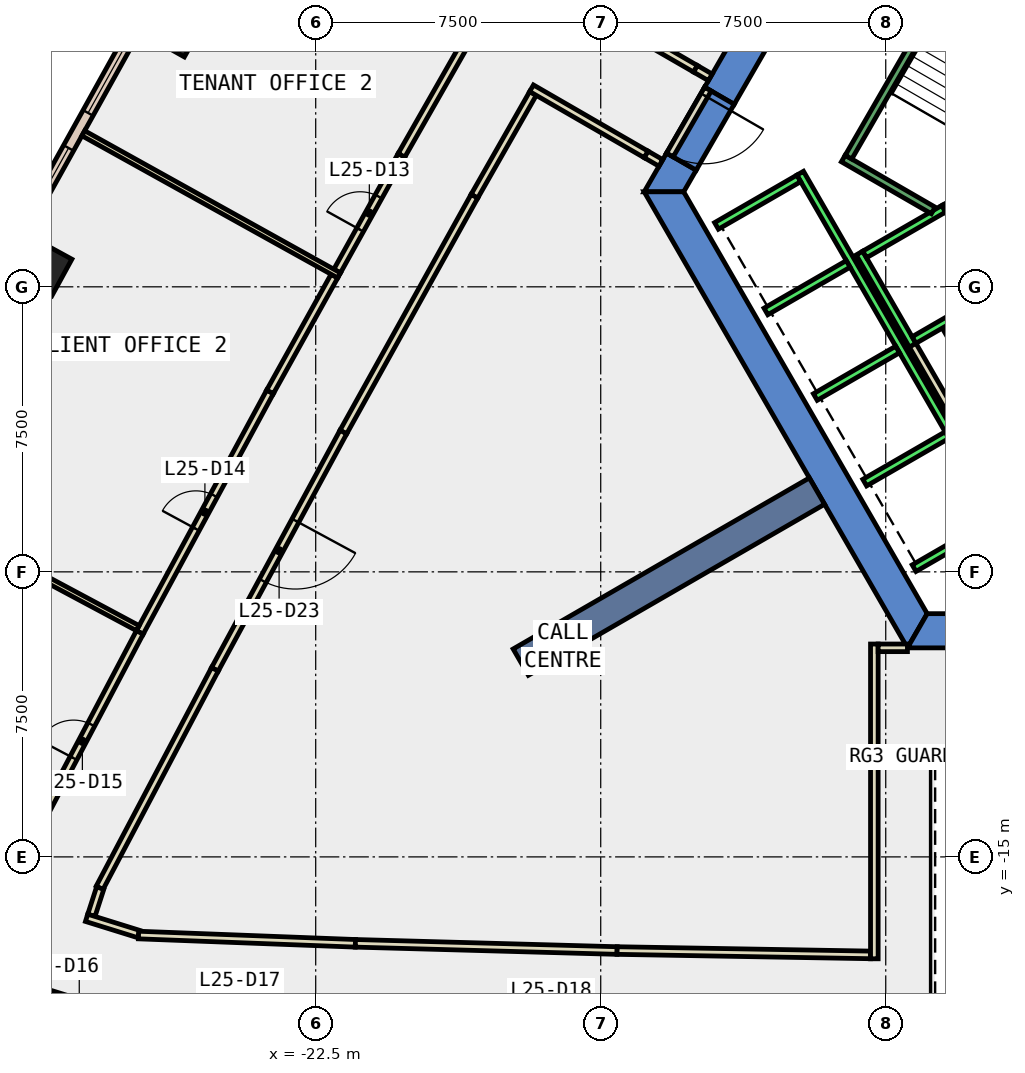
"""IFC4 building model, lengths in metres.
Left out: names, types, materials, properties, quantities, classifications, styles, units other than length and angle.
Written with IfcOpenShell. Run it as: python <this file> out.ifc"""

import sys

from ifc_helpers import new_model, si_unit, direction, frame, frame_2d, origin, origin_2d, place, context, subcontext, project, spatial, polyline, rectangle, outline, extrude, element, fill, save


model = new_model("IFC4")
c1 = context("Model", 3, precision=1e-05, world=origin(), true_north=direction((0.0, 1.0)))
c2 = subcontext(c1, "Body", "Model", "MODEL_VIEW")
j1 = project(units=[si_unit("LENGTHUNIT", "METRE"), si_unit("PLANEANGLEUNIT", "RADIAN")], contexts=[c1])
p1 = place(None, origin())
s1 = spatial("IfcSite", under=j1, at=p1, CompositionType="ELEMENT")
p2 = place(p1, origin())
s2 = spatial("IfcBuilding", under=s1, at=p2, CompositionType="ELEMENT")
p3 = place(p2, frame((0.0, 0.0, 116.0)))
s3 = spatial("IfcBuildingStorey", under=s2, at=p3, CompositionType="ELEMENT", Elevation=116.0)
for number, where, z_axis, x_axis in (
    (1, (-26.341, 6.896, -0.4), (0.0, 0.0, 1.0), (0.49, 0.872, 0.0)),
    (2, (-29.838, 0.604, -0.4), (0.0, 0.0, 1.0), (0.48, 0.877, 0.0)),
):
    element("IfcColumn", number, at=place(p3, frame(where, z_axis=z_axis, x_axis=x_axis)), inside=s3, PredefinedType="COLUMN", context=c2, shape_type="SweptSolid", body=[
        extrude(rectangle(XDim=1.1, YDim=1.5, at=origin_2d()), origin(), (0.0, 0.0, 1.0), 4.2),
    ])
p4 = place(p3, frame((0.0, 0.0, -0.4)))
e3 = element("IfcWall", 3, at=p4, inside=s3, PredefinedType="SHEAR", context=c2, shape_type="SweptSolid", body=[
    extrude(outline(polyline([(-12.267, 5.252), (-11.488, 4.802), (-6.409, 13.6), (-6.928, 14.5), (-12.267, 5.252)])), origin(), (0.0, 0.0, 1.0), 4.2),
])
p5 = place(p3, frame((0.0, 0.0, -0.4)))
e4 = element("IfcWall", 4, at=p5, inside=s3, PredefinedType="SHEAR", context=c2, shape_type="SweptSolid", body=[
    extrude(outline(polyline([(-12.488, 3.07), (-13.267, 3.52), (-13.856, 2.5), (-12.817, 2.5), (-12.488, 3.07)])), origin(), (0.0, 0.0, 1.0), 4.2),
])
p6 = place(p3, frame((0.0, 0.0, 3.6)))
e5 = element("IfcWall", 5, at=p6, inside=s3, PredefinedType="SHEAR", context=c2, shape_type="SweptSolid", body=[
    extrude(outline(polyline([(-13.267, 3.52), (-12.488, 3.07), (-11.488, 4.802), (-12.267, 5.252), (-13.267, 3.52)])), origin(), (0.0, 0.0, 1.0), 0.2),
])
p7 = place(p3, frame((0.0, 0.0, -0.4)))
e6 = element("IfcWall", 6, at=p7, inside=s3, PredefinedType="SHEAR", context=c2, shape_type="SweptSolid", body=[
    extrude(outline(polyline([(-13.856, 2.5), (-6.928, -9.5), (-6.409, -8.6), (-12.817, 2.5), (-13.856, 2.5)])), origin(), (0.0, 0.0, 1.0), 4.2),
])
p8 = place(p3, frame((0.0, 0.0, -0.4)))
e7 = element("IfcWall", 7, at=p8, inside=s3, PredefinedType="SHEAR", context=c2, shape_type="SweptSolid", body=[
    extrude(outline(polyline([(3.75, -9.5), (3.75, -8.6), (-6.409, -8.6), (-6.928, -9.5), (3.75, -9.5)])), origin(), (0.0, 0.0, 1.0), 4.2),
])
p9 = place(p3, frame((-9.31, -5.375, -0.4), z_axis=(0.0, 0.0, 1.0), x_axis=(-0.866017533419, -0.500013631625, 0.0)))
e8 = element("IfcWall", 8, at=p9, inside=s3, PredefinedType="SHEAR", context=c2, shape_type="SweptSolid", body=[
    extrude(rectangle(XDim=9.0, YDim=0.8, at=frame_2d((4.5, 0.0))), origin(), (0.0, 0.0, 1.0), 4.2),
])
p10 = place(p3, frame((-27.262, 6.784, 0.0), z_axis=(0.0, 0.0, 1.0), x_axis=(-0.485822751649, -0.874057351654, 0.0)))
e9 = element("IfcWall", 9, at=p10, inside=s3, PredefinedType="STANDARD", context=c2, shape_type="SweptSolid", body=[
    extrude(rectangle(XDim=6.109, YDim=0.3, at=frame_2d((3.055, 0.0))), origin(), (0.0, 0.0, 1.0), 3.8),
])
p11 = place(p10, frame((0.527, 0.0, 0.9)))
e10 = element("IfcOpeningElement", 10, at=p11, cuts=e9, PredefinedType="OPENING", context=c2, shape_type="SweptSolid", body=[
    extrude(rectangle(XDim=2.0, YDim=2.6, at=frame_2d((1.0, 1.3))), frame((0.0, 0.16, 0.0), z_axis=(0.0, -1.0, 0.0), x_axis=(1.0, 0.0, 0.0)), (0.0, 0.0, 1.0), 0.32),
])
p12 = place(p10, frame((3.582, 0.0, 0.9)))
e11 = element("IfcOpeningElement", 11, at=p12, cuts=e9, PredefinedType="OPENING", context=c2, shape_type="SweptSolid", body=[
    extrude(rectangle(XDim=2.0, YDim=2.6, at=frame_2d((1.0, 1.3))), frame((0.0, 0.16, 0.0), z_axis=(0.0, -1.0, 0.0), x_axis=(1.0, 0.0, 0.0)), (0.0, 0.0, 1.0), 0.32),
])
p13 = place(p3, frame((-15.532, 7.484, 0.0), z_axis=(0.0, 0.0, 1.0), x_axis=(0.866045954906, -0.499964402723, 0.0)))
e12 = element("IfcWall", 12, at=p13, inside=s3, PredefinedType="PARTITIONING", context=c2, shape_type="SweptSolid", body=[
    extrude(rectangle(XDim=3.494, YDim=0.2, at=frame_2d((1.747, 0.0))), origin(), (0.0, 0.0, 1.0), 3.8),
])
p14 = place(p3, frame((-13.417, 3.26, 0.0), z_axis=(0.0, 0.0, 1.0), x_axis=(-0.866032067792, 0.499988457423, 0.0)))
e13 = element("IfcWall", 13, at=p14, inside=s3, PredefinedType="PARTITIONING", context=c2, shape_type="SweptSolid", body=[
    extrude(rectangle(XDim=0.45, YDim=0.2, at=frame_2d((0.225, 0.0))), origin(), (0.0, 0.0, 1.0), 2.4),
])
p15 = place(p3, frame((-16.783, 5.088, 0.0), z_axis=(0.0, 0.0, 1.0), x_axis=(-0.495023676383, -0.868879485211, 0.0)))
e14 = element("IfcWall", 14, at=p15, inside=s3, PredefinedType="PARTITIONING", context=c2, shape_type="SweptSolid", body=[
    extrude(rectangle(XDim=3.113, YDim=0.2, at=frame_2d((1.557, 0.0))), origin(), (0.0, 0.0, 1.0), 3.8),
])
p16 = place(p3, frame((-18.324, 2.383, 0.0), z_axis=(0.0, 0.0, 1.0), x_axis=(-0.485826874234, -0.874055060206, 0.0)))
e15 = element("IfcWall", 15, at=p16, inside=s3, PredefinedType="PARTITIONING", context=c2, shape_type="SweptSolid", body=[
    extrude(rectangle(XDim=7.099, YDim=0.2, at=frame_2d((3.55, 0.0))), origin(), (0.0, 0.0, 1.0), 3.8),
])
p17 = place(p3, frame((-21.773, -3.822, 0.0), z_axis=(0.0, 0.0, 1.0), x_axis=(-0.476124717613, -0.87937776483, 0.0)))
e16 = element("IfcWall", 16, at=p17, inside=s3, PredefinedType="PARTITIONING", context=c2, shape_type="SweptSolid", body=[
    extrude(rectangle(XDim=7.099, YDim=0.2, at=frame_2d((3.55, 0.0))), origin(), (0.0, 0.0, 1.0), 3.8),
])
p18 = place(p17, frame((2.65, 0.0, 0.0)))
e17 = element("IfcOpeningElement", 17, at=p18, cuts=e16, PredefinedType="OPENING", context=c2, shape_type="SweptSolid", body=[
    extrude(rectangle(XDim=1.8, YDim=2.1, at=frame_2d((0.9, 1.05))), frame((0.0, 0.11, 0.0), z_axis=(0.0, -1.0, 0.0), x_axis=(1.0, 0.0, 0.0)), (0.0, 0.0, 1.0), 0.22),
])
p19 = place(p3, frame((-25.153, -10.065, 0.0), z_axis=(0.0, 0.0, 1.0), x_axis=(-0.466663976618, -0.884434696813, 0.0)))
e18 = element("IfcWall", 18, at=p19, inside=s3, PredefinedType="PARTITIONING", context=c2, shape_type="SweptSolid", body=[
    extrude(rectangle(XDim=6.501, YDim=0.2, at=frame_2d((3.25, 0.0))), origin(), (0.0, 0.0, 1.0), 3.8),
])
p20 = place(p3, frame((-28.171, -15.821, 0.0), z_axis=(0.0, 0.0, 1.0), x_axis=(-0.308053137273, -0.951369152651, 0.0)))
e19 = element("IfcWall", 19, at=p20, inside=s3, PredefinedType="PARTITIONING", context=c2, shape_type="SweptSolid", body=[
    extrude(rectangle(XDim=0.754, YDim=0.2, at=frame_2d((0.377, 0.0))), origin(), (0.0, 0.0, 1.0), 3.8),
])
p21 = place(p3, frame((-28.529, -16.603, 0.0), z_axis=(0.0, 0.0, 1.0), x_axis=(0.954829998701, -0.297152609916, 0.0)))
e20 = element("IfcWall", 20, at=p21, inside=s3, PredefinedType="PARTITIONING", context=c2, shape_type="SweptSolid", body=[
    extrude(rectangle(XDim=1.437, YDim=0.2, at=frame_2d((0.719, 0.0))), origin(), (0.0, 0.0, 1.0), 3.8),
])
p22 = place(p3, frame((-27.162, -17.056, 0.0), z_axis=(0.0, 0.0, 1.0), x_axis=(0.999270868304, -0.038180253525, 0.0)))
e21 = element("IfcWall", 21, at=p22, inside=s3, PredefinedType="PARTITIONING", context=c2, shape_type="SweptSolid", body=[
    extrude(rectangle(XDim=5.71, YDim=0.2, at=frame_2d((2.855, 0.0))), origin(), (0.0, 0.0, 1.0), 3.8),
])
p23 = place(p3, frame((-21.456, -17.274, 0.0), z_axis=(0.0, 0.0, 1.0), x_axis=(0.999618915549, -0.02760477632, 0.0)))
e22 = element("IfcWall", 22, at=p23, inside=s3, PredefinedType="PARTITIONING", context=c2, shape_type="SweptSolid", body=[
    extrude(rectangle(XDim=6.89, YDim=0.2, at=frame_2d((3.445, 0.0))), origin(), (0.0, 0.0, 1.0), 3.8),
])
p24 = place(p3, frame((-14.569, -17.464, 0.0), z_axis=(0.0, 0.0, 1.0), x_axis=(0.999851389672, -0.017239448129, 0.0)))
e23 = element("IfcWall", 23, at=p24, inside=s3, PredefinedType="PARTITIONING", context=c2, shape_type="SweptSolid", body=[
    extrude(rectangle(XDim=6.67, YDim=0.2, at=frame_2d((3.335, 0.0))), origin(), (0.0, 0.0, 1.0), 3.8),
])
p25 = place(p3, frame((-21.936, 0.414, 0.0), z_axis=(0.0, 0.0, 1.0), x_axis=(0.485827202541, 0.874054877723, 0.0)))
e24 = element("IfcWall", 24, at=p25, inside=s3, PredefinedType="PARTITIONING", context=c2, shape_type="SweptSolid", body=[
    extrude(rectangle(XDim=3.487, YDim=0.2, at=frame_2d((1.744, 0.0))), origin(), (0.0, 0.0, 1.0), 3.8),
])
p26 = place(p25, frame((1.244, 0.0, 0.0)))
e25 = element("IfcOpeningElement", 25, at=p26, cuts=e24, PredefinedType="OPENING", context=c2, shape_type="SweptSolid", body=[
    extrude(rectangle(XDim=1.0, YDim=2.1, at=frame_2d((0.5, 1.05))), frame((0.0, 0.11, 0.0), z_axis=(0.0, -1.0, 0.0), x_axis=(1.0, 0.0, 0.0)), (0.0, 0.0, 1.0), 0.22),
])
p27 = place(p3, frame((-20.242, 3.462, 0.0), z_axis=(0.0, 0.0, 1.0), x_axis=(0.495309264725, 0.868716715781, 0.0)))
e26 = element("IfcWall", 26, at=p27, inside=s3, PredefinedType="PARTITIONING", context=c2, shape_type="SweptSolid", body=[
    extrude(rectangle(XDim=3.487, YDim=0.2, at=frame_2d((1.743, 0.0))), origin(), (0.0, 0.0, 1.0), 3.8),
])
p28 = place(p3, frame((-27.129, -9.094, 0.0), z_axis=(0.0, 0.0, 1.0), x_axis=(0.476090835435, 0.879396108938, 0.0)))
e27 = element("IfcWall", 27, at=p28, inside=s3, PredefinedType="PARTITIONING", context=c2, shape_type="SweptSolid", body=[
    extrude(rectangle(XDim=7.198, YDim=0.2, at=frame_2d((3.599, 0.0))), origin(), (0.0, 0.0, 1.0), 3.8),
])
p29 = place(p28, frame((3.099, 0.0, 0.0)))
e28 = element("IfcOpeningElement", 28, at=p29, cuts=e27, PredefinedType="OPENING", context=c2, shape_type="SweptSolid", body=[
    extrude(rectangle(XDim=1.0, YDim=2.1, at=frame_2d((0.5, 1.05))), frame((0.0, 0.11, 0.0), z_axis=(0.0, -1.0, 0.0), x_axis=(1.0, 0.0, 0.0)), (0.0, 0.0, 1.0), 0.22),
])
p30 = place(p3, frame((-23.702, -2.764, 0.0), z_axis=(0.0, 0.0, 1.0), x_axis=(0.485892653581, 0.874018494767, 0.0)))
e29 = element("IfcWall", 29, at=p30, inside=s3, PredefinedType="PARTITIONING", context=c2, shape_type="SweptSolid", body=[
    extrude(rectangle(XDim=3.486, YDim=0.2, at=frame_2d((1.743, 0.0))), origin(), (0.0, 0.0, 1.0), 3.8),
])
p31 = place(p3, frame((-30.221, -14.956, 0.0), z_axis=(0.0, 0.0, 1.0), x_axis=(0.466543318111, 0.884498350663, 0.0)))
e30 = element("IfcWall", 30, at=p31, inside=s3, PredefinedType="PARTITIONING", context=c2, shape_type="SweptSolid", body=[
    extrude(rectangle(XDim=6.627, YDim=0.2, at=frame_2d((3.314, 0.0))), origin(), (0.0, 0.0, 1.0), 3.8),
])
p32 = place(p31, frame((2.889, 0.0, 0.0)))
e31 = element("IfcOpeningElement", 31, at=p32, cuts=e30, PredefinedType="OPENING", context=c2, shape_type="SweptSolid", body=[
    extrude(rectangle(XDim=1.0, YDim=2.1, at=frame_2d((0.5, 1.05))), frame((0.0, 0.11, 0.0), z_axis=(0.0, -1.0, 0.0), x_axis=(1.0, 0.0, 0.0)), (0.0, 0.0, 1.0), 0.22),
])
p33 = place(p3, frame((-27.533, -19.217, 0.0), z_axis=(0.0, 0.0, 1.0), x_axis=(-0.954946345159, 0.296778499671, 0.0)))
e32 = element("IfcWall", 32, at=p33, inside=s3, PredefinedType="PARTITIONING", context=c2, shape_type="SweptSolid", body=[
    extrude(rectangle(XDim=2.49, YDim=0.2, at=frame_2d((1.245, 0.0))), origin(), (0.0, 0.0, 1.0), 3.8),
])
p34 = place(p33, frame((0.745, 0.0, 0.0)))
e33 = element("IfcOpeningElement", 33, at=p34, cuts=e32, PredefinedType="OPENING", context=c2, shape_type="SweptSolid", body=[
    extrude(rectangle(XDim=1.0, YDim=2.1, at=frame_2d((0.5, 1.05))), frame((0.0, 0.11, 0.0), z_axis=(0.0, -1.0, 0.0), x_axis=(1.0, 0.0, 0.0)), (0.0, 0.0, 1.0), 0.22),
])
p35 = place(p3, frame((-5.126, -2.422, 0.0), z_axis=(0.0, 0.0, 1.0), x_axis=(-0.500062241894, 0.865989465428, 0.0)))
e34 = element("IfcWall", 34, at=p35, inside=s3, PredefinedType="PARTITIONING", context=c2, shape_type="SweptSolid", body=[
    extrude(rectangle(XDim=1.7, YDim=0.2, at=frame_2d((0.85, 0.0))), origin(), (0.0, 0.0, 1.0), 3.8),
])
p36 = place(p3, frame((-5.492, -3.788, 0.0), z_axis=(0.0, 0.0, 1.0), x_axis=(-0.500008949224, 0.866020236886, 0.0)))
e35 = element("IfcWall", 35, at=p36, inside=s3, PredefinedType="PARTITIONING", context=c2, shape_type="SweptSolid", body=[
    extrude(rectangle(XDim=2.68, YDim=0.2, at=frame_2d((1.34, 0.0))), origin(), (0.0, 0.0, 1.0), 3.8),
])
p37 = place(p3, frame((-7.8, -17.681, 0.0), z_axis=(0.0, 0.0, 1.0), x_axis=(0.0, 1.0, 0.0)))
e36 = element("IfcWall", 36, at=p37, inside=s3, PredefinedType="PARTITIONING", context=c2, shape_type="SweptSolid", body=[
    extrude(rectangle(XDim=8.282, YDim=0.2, at=frame_2d((4.141, 0.0))), origin(), (0.0, 0.0, 1.0), 3.8),
])
p38 = place(p3, frame((-7.7, -9.499, 0.0), z_axis=(0.0, 0.0, 1.0), x_axis=(1.0, 0.0, 0.0)))
e37 = element("IfcWall", 37, at=p38, inside=s3, PredefinedType="PARTITIONING", context=c2, shape_type="SweptSolid", body=[
    extrude(rectangle(XDim=0.771, YDim=0.2, at=frame_2d((0.385, 0.0))), origin(), (0.0, 0.0, 1.0), 3.8),
])
p39 = place(p3, frame((-21.885, 0.3, 0.0), z_axis=(0.0, 0.0, 1.0), x_axis=(-0.874095944746, 0.485753311237, 0.0)))
e38 = element("IfcWall", 38, at=p39, inside=s3, PredefinedType="PARTITIONING", context=c2, shape_type="SweptSolid", body=[
    extrude(rectangle(XDim=7.699, YDim=0.15, at=frame_2d((3.85, 0.0))), origin(), (0.0, 0.0, 1.0), 3.8),
])
p40 = place(p3, frame((-27.182, -8.981, 0.0), z_axis=(0.0, 0.0, 1.0), x_axis=(-0.881899408669, 0.471437623647, 0.0)))
e39 = element("IfcWall", 39, at=p40, inside=s3, PredefinedType="PARTITIONING", context=c2, shape_type="SweptSolid", body=[
    extrude(rectangle(XDim=6.13, YDim=0.15, at=frame_2d((3.065, 0.0))), origin(), (0.0, 0.0, 1.0), 3.8),
])
p41 = place(p3, frame((-12.18, 5.202, 0.0), z_axis=(0.0, 0.0, 1.0), x_axis=(-0.50002537861, -0.866010750942, 0.0)))
e40 = element("IfcWall", 40, at=p41, inside=s3, PredefinedType="PARTITIONING", context=c2, shape_type="SweptSolid", body=[
    extrude(rectangle(XDim=2.0, YDim=0.2, at=frame_2d((1.0, 0.0))), origin(), (0.0, 0.0, 1.0), 2.4),
])
p42 = place(p41, frame((0.19, 0.0, 0.0)))
e41 = element("IfcOpeningElement", 41, at=p42, cuts=e40, PredefinedType="OPENING", context=c2, shape_type="SweptSolid", body=[
    extrude(rectangle(XDim=1.8, YDim=2.1, at=frame_2d((0.9, 1.05))), frame((0.0, 0.11, 0.0), z_axis=(0.0, -1.0, 0.0), x_axis=(1.0, 0.0, 0.0)), (0.0, 0.0, 1.0), 0.22),
])
p43 = place(p3, frame((-12.506, 5.737, 0.0), z_axis=(0.0, 0.0, 1.0), x_axis=(0.865624510465, -0.500693725627, 0.0)))
e42 = element("IfcWall", 42, at=p43, inside=s3, PredefinedType="PARTITIONING", context=c2, shape_type="SweptSolid", body=[
    extrude(rectangle(XDim=0.449, YDim=0.2, at=frame_2d((0.225, 0.0))), origin(), (0.0, 0.0, 1.0), 2.4),
])
p44 = place(p3, frame((-13.807, 3.485, 0.0), z_axis=(0.0, 0.0, 1.0), x_axis=(-0.865984597717, 0.500070671522, 0.0)))
e43 = element("IfcWall", 43, at=p44, inside=s3, PredefinedType="PARTITIONING", context=c2, shape_type="SweptSolid", body=[
    extrude(rectangle(XDim=3.479, YDim=0.2, at=frame_2d((1.74, 0.0))), origin(), (0.0, 0.0, 1.0), 3.8),
])
p45 = place(p3, frame((-5.94, 2.188, 0.0), z_axis=(0.0, 0.0, 1.0), x_axis=(0.49994636267, -0.866056369097, 0.0)))
e44 = element("IfcWall", 44, at=p45, inside=s3, PredefinedType="STANDARD", context=c2, shape_type="SweptSolid", body=[
    extrude(rectangle(XDim=2.8, YDim=0.2, at=frame_2d((1.4, 0.0))), origin(), (0.0, 0.0, 1.0), 3.8),
])
p46 = place(p45, frame((1.225, 0.0, 0.0)))
e45 = element("IfcOpeningElement", 45, at=p46, cuts=e44, PredefinedType="OPENING", context=c2, shape_type="SweptSolid", body=[
    extrude(rectangle(XDim=1.1, YDim=2.1, at=frame_2d((0.55, 1.05))), frame((0.0, 0.11, 0.0), z_axis=(0.0, -1.0, 0.0), x_axis=(1.0, 0.0, 0.0)), (0.0, 0.0, 1.0), 0.22),
])
p47 = place(p3, frame((-8.192, 0.888, 0.0), z_axis=(0.0, 0.0, 1.0), x_axis=(0.49994636267, -0.866056369097, 0.0)))
e46 = element("IfcWall", 46, at=p47, inside=s3, PredefinedType="STANDARD", context=c2, shape_type="SweptSolid", body=[
    extrude(rectangle(XDim=2.8, YDim=0.2, at=frame_2d((1.4, 0.0))), origin(), (0.0, 0.0, 1.0), 3.8),
])
for number, where, z_axis, x_axis in (
    (47, (-5.977, 2.052, 0.0), (0.0, 0.0, 1.0), (-0.866, -0.5, 0.0)),
    (48, (-4.677, -0.2, 0.0), (0.0, 0.0, 1.0), (-0.866, -0.5, 0.0)),
):
    element("IfcWall", number, at=place(p3, frame(where, z_axis=z_axis, x_axis=x_axis)), inside=s3, PredefinedType="STANDARD", context=c2, shape_type="SweptSolid", body=[
        extrude(rectangle(XDim=2.399, YDim=0.2, at=frame_2d((1.2, 0.0))), origin(), (0.0, 0.0, 1.0), 3.8),
    ])
p48 = place(p3, frame((-9.751, 2.99, 0.0), z_axis=(0.0, 0.0, 1.0), x_axis=(0.50000090737, -0.866024879913, 0.0)))
e49 = element("IfcWall", 49, at=p48, inside=s3, PredefinedType="STANDARD", context=c2, shape_type="SweptSolid", body=[
    extrude(rectangle(XDim=10.6, YDim=0.2, at=frame_2d((5.3, 0.0))), origin(), (0.0, 0.0, 1.0), 3.8),
])
p49 = place(p3, frame((-9.788, 2.853, 0.0), z_axis=(0.0, 0.0, 1.0), x_axis=(-0.865998541277, -0.500046524342, 0.0)))
e50 = element("IfcWall", 50, at=p49, inside=s3, PredefinedType="STANDARD", context=c2, shape_type="SweptSolid", body=[
    extrude(rectangle(XDim=2.5, YDim=0.2, at=frame_2d((1.25, 0.0))), origin(), (0.0, 0.0, 1.0), 3.8),
])
for number, where, z_axis, x_axis in (
    (51, (-8.488, 0.602, 0.0), (0.0, 0.0, 1.0), (-0.866, -0.5, 0.0)),
    (52, (-7.188, -1.65, 0.0), (0.0, 0.0, 1.0), (-0.866, -0.5, 0.0)),
    (53, (-5.888, -3.902, 0.0), (0.0, 0.0, 1.0), (-0.866, -0.5, 0.0)),
    (54, (-4.588, -6.153, 0.0), (0.0, 0.0, 1.0), (-0.866, -0.5, 0.0)),
):
    element("IfcWall", number, at=place(p3, frame(where, z_axis=z_axis, x_axis=x_axis)), inside=s3, PredefinedType="STANDARD", context=c2, shape_type="SweptSolid", body=[
        extrude(rectangle(XDim=2.5, YDim=0.2, at=frame_2d((1.25, 0.0))), origin(), (0.0, 0.0, 1.0), 3.8),
    ])
p50 = place(p3, frame((-6.25, 2.01, 0.0), z_axis=(0.0, 0.0, 1.0), x_axis=(-0.86611865017, 0.499838457731, 0.0)))
e55 = element("IfcWall", 55, at=p50, inside=s3, PredefinedType="STANDARD", context=c2, shape_type="SweptSolid", body=[
    extrude(rectangle(XDim=2.733, YDim=0.2, at=frame_2d((1.366, 0.0))), origin(), (0.0, 0.0, 1.0), 3.8),
])
p51 = place(p3, frame((-5.03, 9.388, 0.0), z_axis=(0.0, 0.0, 1.0), x_axis=(-0.499978703459, -0.866037698999, 0.0)))
e56 = element("IfcWall", 56, at=p51, inside=s3, PredefinedType="STANDARD", context=c2, shape_type="SweptSolid", body=[
    extrude(rectangle(XDim=6.9, YDim=0.2, at=frame_2d((3.45, 0.0))), origin(), (0.0, 0.0, 1.0), 3.8),
])
p52 = place(p11, origin())
e57 = element("IfcWindow", 57, at=p52, inside=s3, PartitioningType="SINGLE_PANEL", PredefinedType="WINDOW", context=c2, shape_type="SweptSolid", body=[
    extrude(rectangle(XDim=2.0, YDim=2.6, at=frame_2d((1.0, 1.3))), frame((0.0, 0.03, 0.0), z_axis=(0.0, -1.0, 0.0), x_axis=(1.0, 0.0, 0.0)), (0.0, 0.0, 1.0), 0.06),
])
fill(e10, e57)
p53 = place(p12, origin())
e58 = element("IfcWindow", 58, at=p53, inside=s3, PartitioningType="SINGLE_PANEL", PredefinedType="WINDOW", context=c2, shape_type="SweptSolid", body=[
    extrude(rectangle(XDim=2.0, YDim=2.6, at=frame_2d((1.0, 1.3))), frame((0.0, 0.03, 0.0), z_axis=(0.0, -1.0, 0.0), x_axis=(1.0, 0.0, 0.0)), (0.0, 0.0, 1.0), 0.06),
])
fill(e11, e58)
p54 = place(p26, origin())
e59 = element("IfcDoor", 59, at=p54, inside=s3, OperationType="SINGLE_SWING_RIGHT", PredefinedType="DOOR", context=c2, shape_type="SweptSolid", body=[
    extrude(rectangle(XDim=1.0, YDim=2.1, at=frame_2d((0.5, 1.05))), frame((0.0, 0.025, 0.0), z_axis=(0.0, -1.0, 0.0), x_axis=(1.0, 0.0, 0.0)), (0.0, 0.0, 1.0), 0.05),
])
fill(e25, e59)
p55 = place(p29, origin())
e60 = element("IfcDoor", 60, at=p55, inside=s3, OperationType="SINGLE_SWING_RIGHT", PredefinedType="DOOR", context=c2, shape_type="SweptSolid", body=[
    extrude(rectangle(XDim=1.0, YDim=2.1, at=frame_2d((0.5, 1.05))), frame((0.0, 0.025, 0.0), z_axis=(0.0, -1.0, 0.0), x_axis=(1.0, 0.0, 0.0)), (0.0, 0.0, 1.0), 0.05),
])
fill(e28, e60)
p56 = place(p32, origin())
e61 = element("IfcDoor", 61, at=p56, inside=s3, OperationType="SINGLE_SWING_LEFT", PredefinedType="DOOR", context=c2, shape_type="SweptSolid", body=[
    extrude(rectangle(XDim=1.0, YDim=2.1, at=frame_2d((0.5, 1.05))), frame((0.0, 0.025, 0.0), z_axis=(0.0, -1.0, 0.0), x_axis=(1.0, 0.0, 0.0)), (0.0, 0.0, 1.0), 0.05),
])
fill(e31, e61)
p57 = place(p18, origin())
e62 = element("IfcDoor", 62, at=p57, inside=s3, OperationType="DOUBLE_DOOR_SINGLE_SWING", PredefinedType="DOOR", context=c2, shape_type="SweptSolid", body=[
    extrude(rectangle(XDim=1.8, YDim=2.1, at=frame_2d((0.9, 1.05))), frame((0.0, 0.025, 0.0), z_axis=(0.0, -1.0, 0.0), x_axis=(1.0, 0.0, 0.0)), (0.0, 0.0, 1.0), 0.05),
])
fill(e17, e62)
p58 = place(p42, origin())
e63 = element("IfcDoor", 63, at=p58, inside=s3, OperationType="DOUBLE_DOOR_SINGLE_SWING", PredefinedType="DOOR", context=c2, shape_type="SweptSolid", body=[
    extrude(rectangle(XDim=1.8, YDim=2.1, at=frame_2d((0.9, 1.05))), frame((0.0, 0.025, 0.0), z_axis=(0.0, -1.0, 0.0), x_axis=(1.0, 0.0, 0.0)), (0.0, 0.0, 1.0), 0.05),
])
fill(e41, e63)
save(model, sys.argv[1])
